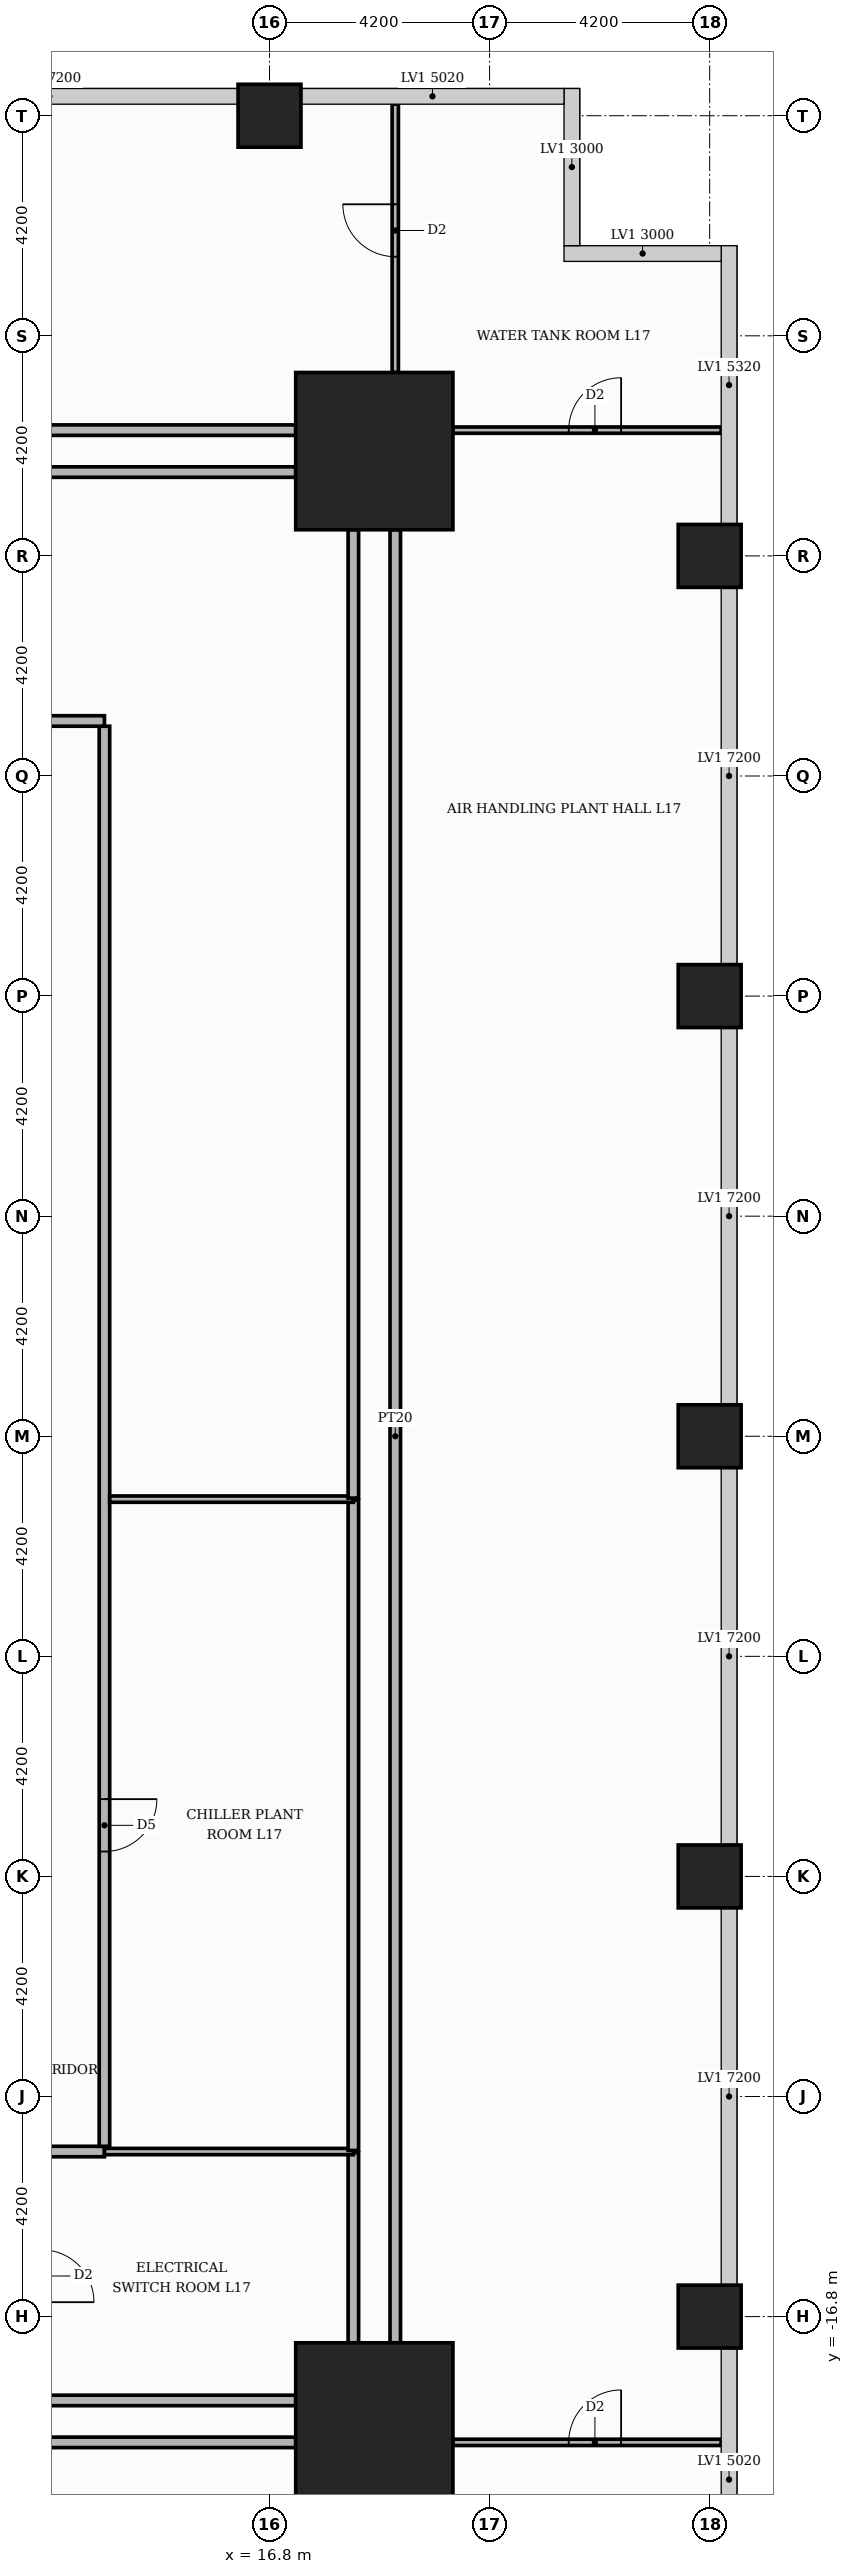
"""IFC4 building model, lengths in metres.
Left out: names, types, materials, properties, quantities, classifications, styles, units other than length and angle.
Written with IfcOpenShell. Run it as: python <this file> out.ifc"""

import sys

from ifc_helpers import new_model, si_unit, direction, frame, frame_2d, origin, origin_2d, place, context, subcontext, project, spatial, rectangle, extrude, element, fill, save


model = new_model("IFC4")
c1 = context("Model", 3, precision=1e-05, world=origin(), true_north=direction((0.0, 1.0)))
c2 = subcontext(c1, "Body", "Model", "MODEL_VIEW")
j1 = project(units=[si_unit("LENGTHUNIT", "METRE"), si_unit("PLANEANGLEUNIT", "RADIAN")], contexts=[c1])
p1 = place(None, origin())
s1 = spatial("IfcSite", under=j1, at=p1, CompositionType="ELEMENT")
p2 = place(p1, origin())
s2 = spatial("IfcBuilding", under=s1, at=p2, CompositionType="ELEMENT")
p3 = place(p2, frame((0.0, 0.0, 73.8)))
s3 = spatial("IfcBuildingStorey", under=s2, at=p3, CompositionType="ELEMENT", Elevation=73.8)
for number, where, z_axis, x_axis in (
    (1, (18.8, 18.8, 0.0), (0.0, 0.0, 1.0), (1.0, 0.0, 0.0)),
    (2, (18.8, -18.8, 0.0), (0.0, 0.0, 1.0), (1.0, 0.0, 0.0)),
):
    element("IfcColumn", number, at=place(p3, frame(where, z_axis=z_axis, x_axis=x_axis)), inside=s3, PredefinedType="COLUMN", context=c2, shape_type="SweptSolid", body=[
        extrude(rectangle(XDim=3.0, YDim=3.0, at=origin_2d()), origin(), (0.0, 0.0, 1.0), 5.4),
    ])
for number, where, z_axis, x_axis in (
    (3, (25.2, 0.0, 0.0), (0.0, 0.0, 1.0), (1.0, 0.0, 0.0)),
    (4, (25.2, 8.4, 0.0), (0.0, 0.0, 1.0), (1.0, 0.0, 0.0)),
    (5, (25.2, 16.8, 0.0), (0.0, 0.0, 1.0), (1.0, 0.0, 0.0)),
    (6, (25.2, -8.4, 0.0), (0.0, 0.0, 1.0), (1.0, 0.0, 0.0)),
    (7, (25.2, -16.8, 0.0), (0.0, 0.0, 1.0), (1.0, 0.0, 0.0)),
    (8, (16.8, 25.2, 0.0), (0.0, 0.0, 1.0), (1.0, 0.0, 0.0)),
):
    element("IfcColumn", number, at=place(p3, frame(where, z_axis=z_axis, x_axis=x_axis)), inside=s3, PredefinedType="COLUMN", context=c2, shape_type="SweptSolid", body=[
        extrude(rectangle(XDim=1.2, YDim=1.2, at=origin_2d()), origin(), (0.0, 0.0, 1.0), 5.4),
    ])
p4 = place(p3, frame((-17.3, -19.2, 0.0), z_axis=(0.0, 0.0, 1.0), x_axis=(1.0, 0.0, 0.0)))
e9 = element("IfcWall", 9, at=p4, inside=s3, PredefinedType="PARTITIONING", context=c2, shape_type="SweptSolid", body=[
    extrude(rectangle(XDim=34.6, YDim=0.2, at=frame_2d((17.3, 0.0))), origin(), (0.0, 0.0, 1.0), 4.98),
])
p5 = place(p4, frame((16.8, 0.0, 0.0)))
e10 = element("IfcOpeningElement", 10, at=p5, cuts=e9, PredefinedType="OPENING", context=c2, shape_type="SweptSolid", body=[
    extrude(rectangle(XDim=1.0, YDim=2.1, at=frame_2d((0.5, 1.05))), frame((0.0, 0.11, 0.0), z_axis=(0.0, -1.0, 0.0), x_axis=(1.0, 0.0, 0.0)), (0.0, 0.0, 1.0), 0.22),
])
p6 = place(p3, frame((20.3, -19.2, 0.0), z_axis=(0.0, 0.0, 1.0), x_axis=(1.0, 0.0, 0.0)))
e11 = element("IfcWall", 11, at=p6, inside=s3, PredefinedType="PARTITIONING", context=c2, shape_type="SweptSolid", body=[
    extrude(rectangle(XDim=5.12, YDim=0.12, at=frame_2d((2.56, 0.0))), origin(), (0.0, 0.0, 1.0), 4.98),
])
p7 = place(p6, frame((2.21, 0.0, 0.0)))
e12 = element("IfcOpeningElement", 12, at=p7, cuts=e11, PredefinedType="OPENING", context=c2, shape_type="SweptSolid", body=[
    extrude(rectangle(XDim=1.0, YDim=2.1, at=frame_2d((0.5, 1.05))), frame((0.0, 0.07, 0.0), z_axis=(0.0, -1.0, 0.0), x_axis=(1.0, 0.0, 0.0)), (0.0, 0.0, 1.0), 0.14),
])
p8 = place(p3, frame((12.47, -18.4, 0.0), z_axis=(0.0, 0.0, 1.0), x_axis=(1.0, 0.0, 0.0)))
e13 = element("IfcWall", 13, at=p8, inside=s3, PredefinedType="PARTITIONING", context=c2, shape_type="SweptSolid", body=[
    extrude(rectangle(XDim=4.83, YDim=0.2, at=frame_2d((2.415, 0.0))), origin(), (0.0, 0.0, 1.0), 4.98),
])
p9 = place(p3, frame((18.4, -17.3, 0.0), z_axis=(0.0, 0.0, 1.0), x_axis=(0.0, 1.0, 0.0)))
e14 = element("IfcWall", 14, at=p9, inside=s3, PredefinedType="PARTITIONING", context=c2, shape_type="SweptSolid", body=[
    extrude(rectangle(XDim=3.63, YDim=0.2, at=frame_2d((1.815, 0.0))), origin(), (0.0, 0.0, 1.0), 4.98),
])
p10 = place(p3, frame((19.2, -17.3, 0.0), z_axis=(0.0, 0.0, 1.0), x_axis=(0.0, 1.0, 0.0)))
e15 = element("IfcWall", 15, at=p10, inside=s3, PredefinedType="PARTITIONING", context=c2, shape_type="SweptSolid", body=[
    extrude(rectangle(XDim=34.6, YDim=0.2, at=frame_2d((17.3, 0.0))), origin(), (0.0, 0.0, 1.0), 4.98),
])
p11 = place(p3, frame((1.05, -13.65, 0.0), z_axis=(0.0, 0.0, 1.0), x_axis=(1.0, 0.0, 0.0)))
e16 = element("IfcWall", 16, at=p11, inside=s3, PredefinedType="PARTITIONING", context=c2, shape_type="SweptSolid", body=[
    extrude(rectangle(XDim=12.6, YDim=0.2, at=frame_2d((6.3, 0.0))), origin(), (0.0, 0.0, 1.0), 4.98),
])
p12 = place(p3, frame((13.65, -13.65, 0.0), z_axis=(0.0, 0.0, 1.0), x_axis=(1.0, 0.0, 0.0)))
e17 = element("IfcWall", 17, at=p12, inside=s3, PredefinedType="PARTITIONING", context=c2, shape_type="SweptSolid", body=[
    extrude(rectangle(XDim=4.75, YDim=0.12, at=frame_2d((2.375, 0.0))), origin(), (0.0, 0.0, 1.0), 4.98),
])
p13 = place(p3, frame((18.4, -13.63, 0.0), z_axis=(0.0, 0.0, 1.0), x_axis=(0.0, 1.0, 0.0)))
e18 = element("IfcWall", 18, at=p13, inside=s3, PredefinedType="PARTITIONING", context=c2, shape_type="SweptSolid", body=[
    extrude(rectangle(XDim=12.41, YDim=0.2, at=frame_2d((6.205, 0.0))), origin(), (0.0, 0.0, 1.0), 4.98),
])
p14 = place(p3, frame((13.65, -13.55, 0.0), z_axis=(0.0, 0.0, 1.0), x_axis=(0.0, 1.0, 0.0)))
e19 = element("IfcWall", 19, at=p14, inside=s3, PredefinedType="PARTITIONING", context=c2, shape_type="SweptSolid", body=[
    extrude(rectangle(XDim=27.1, YDim=0.2, at=frame_2d((13.55, 0.0))), origin(), (0.0, 0.0, 1.0), 4.98),
])
p15 = place(p14, frame((5.625, 0.0, 0.0)))
e20 = element("IfcOpeningElement", 20, at=p15, cuts=e19, PredefinedType="OPENING", context=c2, shape_type="SweptSolid", body=[
    extrude(rectangle(XDim=1.0, YDim=2.1, at=frame_2d((0.5, 1.05))), frame((0.0, 0.11, 0.0), z_axis=(0.0, -1.0, 0.0), x_axis=(1.0, 0.0, 0.0)), (0.0, 0.0, 1.0), 0.22),
])
p16 = place(p3, frame((13.75, -1.2, 0.0), z_axis=(0.0, 0.0, 1.0), x_axis=(1.0, 0.0, 0.0)))
e21 = element("IfcWall", 21, at=p16, inside=s3, PredefinedType="PARTITIONING", context=c2, shape_type="SweptSolid", body=[
    extrude(rectangle(XDim=4.65, YDim=0.12, at=frame_2d((2.325, 0.0))), origin(), (0.0, 0.0, 1.0), 4.98),
])
p17 = place(p3, frame((18.4, -1.18, 0.0), z_axis=(0.0, 0.0, 1.0), x_axis=(0.0, 1.0, 0.0)))
e22 = element("IfcWall", 22, at=p17, inside=s3, PredefinedType="PARTITIONING", context=c2, shape_type="SweptSolid", body=[
    extrude(rectangle(XDim=18.48, YDim=0.2, at=frame_2d((9.24, 0.0))), origin(), (0.0, 0.0, 1.0), 4.98),
])
p18 = place(p3, frame((-13.65, 13.65, 0.0), z_axis=(0.0, 0.0, 1.0), x_axis=(1.0, 0.0, 0.0)))
e23 = element("IfcWall", 23, at=p18, inside=s3, PredefinedType="PARTITIONING", context=c2, shape_type="SweptSolid", body=[
    extrude(rectangle(XDim=27.3, YDim=0.2, at=frame_2d((13.65, 0.0))), origin(), (0.0, 0.0, 1.0), 4.98),
])
p19 = place(p18, frame((13.05, 0.0, 0.0)))
e24 = element("IfcOpeningElement", 24, at=p19, cuts=e23, PredefinedType="OPENING", context=c2, shape_type="SweptSolid", body=[
    extrude(rectangle(XDim=1.2, YDim=2.1, at=frame_2d((0.6, 1.05))), frame((0.0, 0.11, 0.0), z_axis=(0.0, -1.0, 0.0), x_axis=(1.0, 0.0, 0.0)), (0.0, 0.0, 1.0), 0.22),
])
for number, where, z_axis, x_axis in (
    (25, (-17.3, 18.4, 0.0), (0.0, 0.0, 1.0), (1.0, 0.0, 0.0)),
    (26, (-17.3, 19.2, 0.0), (0.0, 0.0, 1.0), (1.0, 0.0, 0.0)),
):
    element("IfcWall", number, at=place(p3, frame(where, z_axis=z_axis, x_axis=x_axis)), inside=s3, PredefinedType="PARTITIONING", context=c2, shape_type="SweptSolid", body=[
        extrude(rectangle(XDim=34.6, YDim=0.2, at=frame_2d((17.3, 0.0))), origin(), (0.0, 0.0, 1.0), 4.98),
    ])
p20 = place(p3, frame((20.3, 19.2, 0.0), z_axis=(0.0, 0.0, 1.0), x_axis=(1.0, 0.0, 0.0)))
e27 = element("IfcWall", 27, at=p20, inside=s3, PredefinedType="PARTITIONING", context=c2, shape_type="SweptSolid", body=[
    extrude(rectangle(XDim=5.12, YDim=0.12, at=frame_2d((2.56, 0.0))), origin(), (0.0, 0.0, 1.0), 4.98),
])
p21 = place(p20, frame((2.21, 0.0, 0.0)))
e28 = element("IfcOpeningElement", 28, at=p21, cuts=e27, PredefinedType="OPENING", context=c2, shape_type="SweptSolid", body=[
    extrude(rectangle(XDim=1.0, YDim=2.1, at=frame_2d((0.5, 1.05))), frame((0.0, 0.07, 0.0), z_axis=(0.0, -1.0, 0.0), x_axis=(1.0, 0.0, 0.0)), (0.0, 0.0, 1.0), 0.14),
])
p22 = place(p3, frame((19.2, 20.3, 0.0), z_axis=(0.0, 0.0, 1.0), x_axis=(0.0, 1.0, 0.0)))
e29 = element("IfcWall", 29, at=p22, inside=s3, PredefinedType="PARTITIONING", context=c2, shape_type="SweptSolid", body=[
    extrude(rectangle(XDim=5.12, YDim=0.12, at=frame_2d((2.56, 0.0))), origin(), (0.0, 0.0, 1.0), 4.98),
])
p23 = place(p22, frame((2.21, 0.0, 0.0)))
e30 = element("IfcOpeningElement", 30, at=p23, cuts=e29, PredefinedType="OPENING", context=c2, shape_type="SweptSolid", body=[
    extrude(rectangle(XDim=1.0, YDim=2.1, at=frame_2d((0.5, 1.05))), frame((0.0, 0.07, 0.0), z_axis=(0.0, -1.0, 0.0), x_axis=(1.0, 0.0, 0.0)), (0.0, 0.0, 1.0), 0.14),
])
p24 = place(p15, frame((1.0, 0.0, 0.0), z_axis=(0.0, 0.0, 1.0), x_axis=(-1.0, 0.0, 0.0)))
e31 = element("IfcDoor", 31, at=p24, inside=s3, OperationType="SINGLE_SWING_RIGHT", PredefinedType="DOOR", context=c2, shape_type="SweptSolid", body=[
    extrude(rectangle(XDim=1.0, YDim=2.1, at=frame_2d((0.5, 1.05))), frame((0.0, 0.025, 0.0), z_axis=(0.0, -1.0, 0.0), x_axis=(1.0, 0.0, 0.0)), (0.0, 0.0, 1.0), 0.05),
])
fill(e20, e31)
p25 = place(p7, origin())
e32 = element("IfcDoor", 32, at=p25, inside=s3, OperationType="SINGLE_SWING_RIGHT", PredefinedType="DOOR", context=c2, shape_type="SweptSolid", body=[
    extrude(rectangle(XDim=1.0, YDim=2.1, at=frame_2d((0.5, 1.05))), frame((0.0, 0.025, 0.0), z_axis=(0.0, -1.0, 0.0), x_axis=(1.0, 0.0, 0.0)), (0.0, 0.0, 1.0), 0.05),
])
fill(e12, e32)
p26 = place(p21, origin())
e33 = element("IfcDoor", 33, at=p26, inside=s3, OperationType="SINGLE_SWING_RIGHT", PredefinedType="DOOR", context=c2, shape_type="SweptSolid", body=[
    extrude(rectangle(XDim=1.0, YDim=2.1, at=frame_2d((0.5, 1.05))), frame((0.0, 0.025, 0.0), z_axis=(0.0, -1.0, 0.0), x_axis=(1.0, 0.0, 0.0)), (0.0, 0.0, 1.0), 0.05),
])
fill(e28, e33)
p27 = place(p23, origin())
e34 = element("IfcDoor", 34, at=p27, inside=s3, OperationType="SINGLE_SWING_RIGHT", PredefinedType="DOOR", context=c2, shape_type="SweptSolid", body=[
    extrude(rectangle(XDim=1.0, YDim=2.1, at=frame_2d((0.5, 1.05))), frame((0.0, 0.025, 0.0), z_axis=(0.0, -1.0, 0.0), x_axis=(1.0, 0.0, 0.0)), (0.0, 0.0, 1.0), 0.05),
])
fill(e30, e34)
save(model, sys.argv[1])
